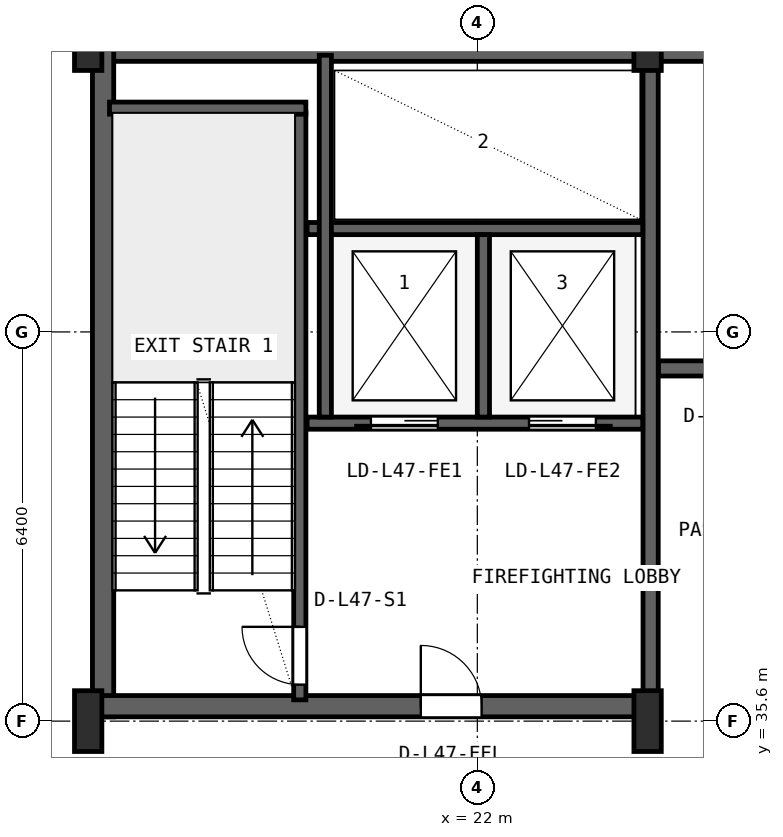
"""IFC4 building model, lengths in metres.
Left out: names, types, materials, properties, quantities, classifications, styles, units other than length and angle.
Written with IfcOpenShell. Run it as: python <this file> out.ifc"""

import sys

from ifc_helpers import new_model, si_unit, direction, frame, frame_2d, origin, origin_2d, place, context, subcontext, project, spatial, rectangle, i_section, extrude, source, transform, mapped, element, fill, save


model = new_model("IFC4")
c1 = context("Model", 3, precision=1e-05, world=origin(), true_north=direction((0.0, 1.0)))
c2 = subcontext(c1, "Body", "Model", "MODEL_VIEW")
j1 = project(units=[si_unit("LENGTHUNIT", "METRE"), si_unit("PLANEANGLEUNIT", "RADIAN")], contexts=[c1])
p1 = place(None, origin())
s1 = spatial("IfcSite", under=j1, at=p1, CompositionType="ELEMENT")
p2 = place(p1, origin())
s2 = spatial("IfcBuilding", under=s1, at=p2, CompositionType="ELEMENT")
p3 = place(p2, frame((0.0, 0.0, 191.4)))
s3 = spatial("IfcBuildingStorey", under=s2, at=p3, CompositionType="ELEMENT", Elevation=191.4)
p4 = place(p3, frame((15.6, 46.625, 0.0), z_axis=(0.0, 0.0, 1.0), x_axis=(1.0, 0.0, 0.0)))
e1 = element("IfcWall", 1, at=p4, inside=s3, PredefinedType="SHEAR", context=c2, shape_type="SweptSolid", body=[
    extrude(rectangle(XDim=36.8, YDim=0.35, at=frame_2d((18.4, 0.0))), origin(), (0.0, 0.0, 1.0), 4.35),
])
p5 = place(p3, frame((15.845, 35.67, 0.0), z_axis=(0.0, 0.0, 1.0), x_axis=(0.0, 1.0, 0.0)))
e2 = element("IfcWall", 2, at=p5, inside=s3, PredefinedType="SHEAR", context=c2, shape_type="SweptSolid", body=[
    extrude(rectangle(XDim=11.13, YDim=0.35, at=frame_2d((5.565, 0.0))), origin(), (0.0, 0.0, 1.0), 4.35),
])
p6 = place(p3, frame((15.67, 35.845, 0.0), z_axis=(0.0, 0.0, 1.0), x_axis=(1.0, 0.0, 0.0)))
e3 = element("IfcWall", 3, at=p6, inside=s3, PredefinedType="SHEAR", context=c2, shape_type="SweptSolid", body=[
    extrude(rectangle(XDim=9.13, YDim=0.35, at=frame_2d((4.565, 0.0))), origin(), (0.0, 0.0, 1.0), 4.35),
])
p7 = place(p6, frame((5.4, 0.0, 0.0)))
e4 = element("IfcOpeningElement", 4, at=p7, cuts=e3, PredefinedType="OPENING", context=c2, shape_type="SweptSolid", body=[
    extrude(rectangle(XDim=1.0, YDim=2.1, at=frame_2d((0.5, 1.05))), frame((0.0, 0.185, 0.0), z_axis=(0.0, -1.0, 0.0), x_axis=(1.0, 0.0, 0.0)), (0.0, 0.0, 1.0), 0.37),
])
m1 = source(origin(), c2, "Body", "SweptSolid", [
    extrude(i_section(OverallWidth=0.45, OverallDepth=1.0, WebThickness=0.016, FlangeThickness=0.03, FilletRadius=0.016, at=origin_2d()), origin(), (0.0, 0.0, 1.0), 4.6),
])
for number, where, z_axis, x_axis in (
    (5, (15.6, 35.6, 0.0), (0.0, 0.0, 1.0), (1.0, 0.0, 0.0)),
    (6, (15.6, 46.8, 0.0), (0.0, 0.0, 1.0), (1.0, 0.0, 0.0)),
    (7, (24.8, 35.6, 0.0), (0.0, 0.0, 1.0), (1.0, 0.0, 0.0)),
    (8, (24.8, 46.8, 0.0), (0.0, 0.0, 1.0), (1.0, 0.0, 0.0)),
):
    element("IfcColumn", number, at=place(p3, frame(where, z_axis=z_axis, x_axis=x_axis)), inside=s3, PredefinedType="COLUMN", context=c2, shape_type="MappedRepresentation", body=[
        mapped(m1, transform((0.0, 0.0, 0.0), x_axis=(1.0, 0.0, 0.0), y_axis=(0.0, 1.0, 0.0), z_axis=(0.0, 0.0, 1.0), scale=1.0)),
    ])
p8 = place(p3, frame((19.08, 35.95, 0.0), z_axis=(0.0, 0.0, 1.0), x_axis=(0.0, 1.0, 0.0)))
e9 = element("IfcWall", 9, at=p8, inside=s3, PredefinedType="SHEAR", context=c2, shape_type="SweptSolid", body=[
    extrude(rectangle(XDim=9.65, YDim=0.2, at=frame_2d((4.825, 0.0))), origin(), (0.0, 0.0, 1.0), 4.35),
])
p9 = place(p8, frame((0.25, 0.0, 0.0)))
e10 = element("IfcOpeningElement", 10, at=p9, cuts=e9, PredefinedType="OPENING", context=c2, shape_type="SweptSolid", body=[
    extrude(rectangle(XDim=0.95, YDim=2.1, at=frame_2d((0.475, 1.05))), frame((0.0, 0.11, 0.0), z_axis=(0.0, -1.0, 0.0), x_axis=(1.0, 0.0, 0.0)), (0.0, 0.0, 1.0), 0.22),
])
p10 = place(p3, frame((15.95, 45.68, 0.0), z_axis=(0.0, 0.0, 1.0), x_axis=(1.0, 0.0, 0.0)))
e11 = element("IfcWall", 11, at=p10, inside=s3, PredefinedType="SHEAR", context=c2, shape_type="SweptSolid", body=[
    extrude(rectangle(XDim=3.23, YDim=0.2, at=frame_2d((1.615, 0.0))), origin(), (0.0, 0.0, 1.0), 4.35),
])
p11 = place(p3, frame((24.85, 36.05, 0.0), z_axis=(0.0, 0.0, 1.0), x_axis=(0.0, 1.0, 0.0)))
e12 = element("IfcWall", 12, at=p11, inside=s3, PredefinedType="SHEAR", context=c2, shape_type="SweptSolid", body=[
    extrude(rectangle(XDim=10.45, YDim=0.25, at=frame_2d((5.225, 0.0))), origin(), (0.0, 0.0, 1.0), 4.35),
])
p12 = place(p3, frame((19.2, 40.5, 0.0), z_axis=(0.0, 0.0, 1.0), x_axis=(1.0, 0.0, 0.0)))
e13 = element("IfcWall", 13, at=p12, inside=s3, PredefinedType="SHEAR", context=c2, shape_type="SweptSolid", body=[
    extrude(rectangle(XDim=5.52, YDim=0.2, at=frame_2d((2.76, 0.0))), origin(), (0.0, 0.0, 1.0), 4.35),
])
p13 = place(p12, frame((1.05, 0.0, 0.0)))
e14 = element("IfcOpeningElement", 14, at=p13, cuts=e13, PredefinedType="OPENING", context=c2, shape_type="SweptSolid", body=[
    extrude(rectangle(XDim=1.1, YDim=2.18, at=frame_2d((0.55, 1.09))), frame((0.0, 0.11, 0.0), z_axis=(0.0, -1.0, 0.0), x_axis=(1.0, 0.0, 0.0)), (0.0, 0.0, 1.0), 0.22),
])
p14 = place(p12, frame((3.65, 0.0, 0.0)))
e15 = element("IfcOpeningElement", 15, at=p14, cuts=e13, PredefinedType="OPENING", context=c2, shape_type="SweptSolid", body=[
    extrude(rectangle(XDim=1.1, YDim=2.18, at=frame_2d((0.55, 1.09))), frame((0.0, 0.11, 0.0), z_axis=(0.0, -1.0, 0.0), x_axis=(1.0, 0.0, 0.0)), (0.0, 0.0, 1.0), 0.22),
])
p15 = place(p3, frame((19.2, 43.7, 0.0), z_axis=(0.0, 0.0, 1.0), x_axis=(1.0, 0.0, 0.0)))
e16 = element("IfcWall", 16, at=p15, inside=s3, PredefinedType="SHEAR", context=c2, shape_type="SweptSolid", body=[
    extrude(rectangle(XDim=5.52, YDim=0.2, at=frame_2d((2.76, 0.0))), origin(), (0.0, 0.0, 1.0), 4.35),
])
p16 = place(p3, frame((22.1, 40.6, 0.0), z_axis=(0.0, 0.0, 1.0), x_axis=(0.0, 1.0, 0.0)))
e17 = element("IfcWall", 17, at=p16, inside=s3, PredefinedType="SHEAR", context=c2, shape_type="SweptSolid", body=[
    extrude(rectangle(XDim=3.0, YDim=0.2, at=frame_2d((1.5, 0.0))), origin(), (0.0, 0.0, 1.0), 4.35),
])
p17 = place(p3, frame((19.5, 40.6, 0.0), z_axis=(0.0, 0.0, 1.0), x_axis=(0.0, 1.0, 0.0)))
e18 = element("IfcWall", 18, at=p17, inside=s3, PredefinedType="SHEAR", context=c2, shape_type="SweptSolid", body=[
    extrude(rectangle(XDim=5.95, YDim=0.2, at=frame_2d((2.975, 0.0))), origin(), (0.0, 0.0, 1.0), 4.35),
])
p18 = place(p3, frame((24.98, 41.4, 0.0), z_axis=(0.0, 0.0, 1.0), x_axis=(1.0, 0.0, 0.0)))
e19 = element("IfcWall", 19, at=p18, inside=s3, PredefinedType="SHEAR", context=c2, shape_type="SweptSolid", body=[
    extrude(rectangle(XDim=23.82, YDim=0.25, at=frame_2d((11.91, 0.0))), origin(), (0.0, 0.0, 1.0), 4.35),
])
p19 = place(p18, frame((8.87, 0.0, 0.0)))
e20 = element("IfcOpeningElement", 20, at=p19, cuts=e19, PredefinedType="OPENING", context=c2, shape_type="SweptSolid", body=[
    extrude(rectangle(XDim=1.1, YDim=2.18, at=frame_2d((0.55, 1.09))), frame((0.0, 0.135, 0.0), z_axis=(0.0, -1.0, 0.0), x_axis=(1.0, 0.0, 0.0)), (0.0, 0.0, 1.0), 0.27),
])
p20 = place(p18, frame((11.47, 0.0, 0.0)))
e21 = element("IfcOpeningElement", 21, at=p20, cuts=e19, PredefinedType="OPENING", context=c2, shape_type="SweptSolid", body=[
    extrude(rectangle(XDim=1.1, YDim=2.18, at=frame_2d((0.55, 1.09))), frame((0.0, 0.135, 0.0), z_axis=(0.0, -1.0, 0.0), x_axis=(1.0, 0.0, 0.0)), (0.0, 0.0, 1.0), 0.27),
])
p21 = place(p18, frame((14.07, 0.0, 0.0)))
e22 = element("IfcOpeningElement", 22, at=p21, cuts=e19, PredefinedType="OPENING", context=c2, shape_type="SweptSolid", body=[
    extrude(rectangle(XDim=1.1, YDim=2.18, at=frame_2d((0.55, 1.09))), frame((0.0, 0.135, 0.0), z_axis=(0.0, -1.0, 0.0), x_axis=(1.0, 0.0, 0.0)), (0.0, 0.0, 1.0), 0.27),
])
p22 = place(p18, frame((16.87, 0.0, 0.0)))
e23 = element("IfcOpeningElement", 23, at=p22, cuts=e19, PredefinedType="OPENING", context=c2, shape_type="SweptSolid", body=[
    extrude(rectangle(XDim=1.1, YDim=2.18, at=frame_2d((0.55, 1.09))), frame((0.0, 0.135, 0.0), z_axis=(0.0, -1.0, 0.0), x_axis=(1.0, 0.0, 0.0)), (0.0, 0.0, 1.0), 0.27),
])
p23 = place(p18, frame((19.47, 0.0, 0.0)))
e24 = element("IfcOpeningElement", 24, at=p23, cuts=e19, PredefinedType="OPENING", context=c2, shape_type="SweptSolid", body=[
    extrude(rectangle(XDim=1.1, YDim=2.18, at=frame_2d((0.55, 1.09))), frame((0.0, 0.135, 0.0), z_axis=(0.0, -1.0, 0.0), x_axis=(1.0, 0.0, 0.0)), (0.0, 0.0, 1.0), 0.27),
])
p24 = place(p18, frame((22.07, 0.0, 0.0)))
e25 = element("IfcOpeningElement", 25, at=p24, cuts=e19, PredefinedType="OPENING", context=c2, shape_type="SweptSolid", body=[
    extrude(rectangle(XDim=1.1, YDim=2.18, at=frame_2d((0.55, 1.09))), frame((0.0, 0.135, 0.0), z_axis=(0.0, -1.0, 0.0), x_axis=(1.0, 0.0, 0.0)), (0.0, 0.0, 1.0), 0.27),
])
p25 = place(p18, frame((0.96, 0.0, 0.0)))
e26 = element("IfcOpeningElement", 26, at=p25, cuts=e19, PredefinedType="OPENING", context=c2, shape_type="SweptSolid", body=[
    extrude(rectangle(XDim=1.0, YDim=2.08, at=frame_2d((0.5, 1.04))), frame((0.0, 0.135, 0.0), z_axis=(0.0, -1.0, 0.0), x_axis=(1.0, 0.0, 0.0)), (0.0, 0.0, 1.0), 0.27),
])
p26 = place(p18, frame((3.56, 0.0, 0.0)))
e27 = element("IfcOpeningElement", 27, at=p26, cuts=e19, PredefinedType="OPENING", context=c2, shape_type="SweptSolid", body=[
    extrude(rectangle(XDim=1.0, YDim=2.08, at=frame_2d((0.5, 1.04))), frame((0.0, 0.135, 0.0), z_axis=(0.0, -1.0, 0.0), x_axis=(1.0, 0.0, 0.0)), (0.0, 0.0, 1.0), 0.27),
])
p27 = place(p18, frame((6.16, 0.0, 0.0)))
e28 = element("IfcOpeningElement", 28, at=p27, cuts=e19, PredefinedType="OPENING", context=c2, shape_type="SweptSolid", body=[
    extrude(rectangle(XDim=0.92, YDim=2.08, at=frame_2d((0.46, 1.04))), frame((0.0, 0.135, 0.0), z_axis=(0.0, -1.0, 0.0), x_axis=(1.0, 0.0, 0.0)), (0.0, 0.0, 1.0), 0.27),
])
m2 = source(origin(), c2, "Body", "SweptSolid", [
    extrude(rectangle(XDim=0.95, YDim=2.1, at=frame_2d((0.475, 1.05))), frame((0.0, 0.025, 0.0), z_axis=(0.0, -1.0, 0.0), x_axis=(1.0, 0.0, 0.0)), (0.0, 0.0, 1.0), 0.05),
])
p28 = place(p9, origin())
e29 = element("IfcDoor", 29, at=p28, inside=s3, OperationType="SINGLE_SWING_RIGHT", PredefinedType="DOOR", context=c2, shape_type="MappedRepresentation", body=[
    mapped(m2, transform((0.0, 0.0, 0.0), x_axis=(1.0, 0.0, 0.0), y_axis=(0.0, 1.0, 0.0), z_axis=(0.0, 0.0, 1.0), scale=1.0)),
])
fill(e10, e29)
m3 = source(origin(), c2, "Body", "SweptSolid", [
    extrude(rectangle(XDim=1.0, YDim=2.1, at=frame_2d((0.5, 1.05))), frame((0.0, 0.025, 0.0), z_axis=(0.0, -1.0, 0.0), x_axis=(1.0, 0.0, 0.0)), (0.0, 0.0, 1.0), 0.05),
])
p29 = place(p7, origin())
e30 = element("IfcDoor", 30, at=p29, inside=s3, OperationType="SINGLE_SWING_LEFT", PredefinedType="DOOR", context=c2, shape_type="MappedRepresentation", body=[
    mapped(m3, transform((0.0, 0.0, 0.0), x_axis=(1.0, 0.0, 0.0), y_axis=(0.0, 1.0, 0.0), z_axis=(0.0, 0.0, 1.0), scale=1.0)),
])
fill(e4, e30)
m4 = source(origin(), c2, "Body", "SweptSolid", [
    extrude(rectangle(XDim=1.1, YDim=2.18, at=frame_2d((0.55, 1.09))), frame((0.0, 0.025, 0.0), z_axis=(0.0, -1.0, 0.0), x_axis=(1.0, 0.0, 0.0)), (0.0, 0.0, 1.0), 0.05),
])
p30 = place(p13, frame((1.1, 0.0, 0.0), z_axis=(0.0, 0.0, 1.0), x_axis=(-1.0, 0.0, 0.0)))
e31 = element("IfcDoor", 31, at=p30, inside=s3, OperationType="SLIDING_TO_LEFT", PredefinedType="DOOR", context=c2, shape_type="MappedRepresentation", body=[
    mapped(m4, transform((0.0, 0.0, 0.0), x_axis=(1.0, 0.0, 0.0), y_axis=(0.0, 1.0, 0.0), z_axis=(0.0, 0.0, 1.0), scale=1.0)),
])
fill(e14, e31)
p31 = place(p14, frame((1.1, 0.0, 0.0), z_axis=(0.0, 0.0, 1.0), x_axis=(-1.0, 0.0, 0.0)))
e32 = element("IfcDoor", 32, at=p31, inside=s3, OperationType="SLIDING_TO_RIGHT", PredefinedType="DOOR", context=c2, shape_type="MappedRepresentation", body=[
    mapped(m4, transform((0.0, 0.0, 0.0), x_axis=(1.0, 0.0, 0.0), y_axis=(0.0, 1.0, 0.0), z_axis=(0.0, 0.0, 1.0), scale=1.0)),
])
fill(e15, e32)
save(model, sys.argv[1])
